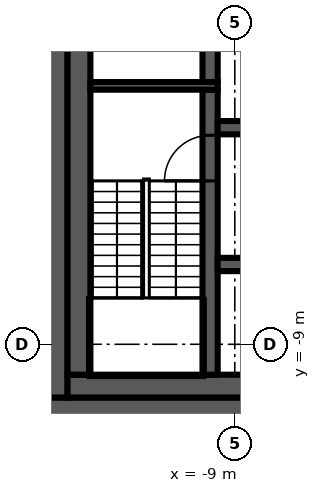
"""IFC4 building model, lengths in metres.
Left out: names, types, materials, properties, quantities, classifications, styles, units other than length and angle.
Written with IfcOpenShell. Run it as: python <this file> out.ifc"""

import sys

from ifc_helpers import new_model, si_unit, direction, frame, frame_2d, origin, place, context, subcontext, project, spatial, rectangle, extrude, element, fill, save


model = new_model("IFC4")
c1 = context("Model", 3, precision=1e-05, world=origin(), true_north=direction((0.0, 1.0)))
c2 = subcontext(c1, "Body", "Model", "MODEL_VIEW")
j1 = project(units=[si_unit("LENGTHUNIT", "METRE"), si_unit("PLANEANGLEUNIT", "RADIAN")], contexts=[c1])
p1 = place(None, origin())
s1 = spatial("IfcSite", under=j1, at=p1, CompositionType="ELEMENT")
p2 = place(p1, origin())
s2 = spatial("IfcBuilding", under=s1, at=p2, CompositionType="ELEMENT")
p3 = place(p2, frame((0.0, 0.0, 336.2)))
s3 = spatial("IfcBuildingStorey", under=s2, at=p3, CompositionType="ELEMENT", Elevation=336.2)
p4 = place(p3, frame((14.0, -10.7, 0.0), z_axis=(0.0, 0.0, 1.0), x_axis=(-1.0, 0.0, 0.0)))
e1 = element("IfcWall", 1, at=p4, inside=s3, PredefinedType="SHEAR", context=c2, shape_type="SweptSolid", body=[
    extrude(rectangle(XDim=28.0, YDim=0.6, at=frame_2d((14.0, 0.0))), origin(), (0.0, 0.0, 1.0), 3.82),
])
p5 = place(p4, frame((5.1, 0.0, 0.0)))
e2 = element("IfcOpeningElement", 2, at=p5, cuts=e1, PredefinedType="OPENING", context=c2, shape_type="SweptSolid", body=[
    extrude(rectangle(XDim=1.6, YDim=2.1, at=frame_2d((0.8, 1.05))), frame((0.0, 0.31, 0.0), z_axis=(0.0, -1.0, 0.0), x_axis=(1.0, 0.0, 0.0)), (0.0, 0.0, 1.0), 0.62),
])
p6 = place(p3, frame((-13.7, -10.4, 0.0), z_axis=(0.0, 0.0, 1.0), x_axis=(0.0, 1.0, 0.0)))
e3 = element("IfcWall", 3, at=p6, inside=s3, PredefinedType="SHEAR", context=c2, shape_type="SweptSolid", body=[
    extrude(rectangle(XDim=20.8, YDim=0.6, at=frame_2d((10.4, 0.0))), origin(), (0.0, 0.0, 1.0), 3.82),
])
p7 = place(p3, frame((6.9, -10.1, 0.0), z_axis=(0.0, 0.0, 1.0), x_axis=(-1.0, 0.0, 0.0)))
e4 = element("IfcWall", 4, at=p7, inside=s3, PredefinedType="SHEAR", context=c2, shape_type="SweptSolid", body=[
    extrude(rectangle(XDim=20.3, YDim=0.6, at=frame_2d((10.15, 0.0))), origin(), (0.0, 0.0, 1.0), 3.82),
])
p8 = place(p3, frame((-13.1, -9.8, 0.0), z_axis=(0.0, 0.0, 1.0), x_axis=(0.0, 1.0, 0.0)))
e5 = element("IfcWall", 5, at=p8, inside=s3, PredefinedType="SHEAR", context=c2, shape_type="SweptSolid", body=[
    extrude(rectangle(XDim=19.6, YDim=0.6, at=frame_2d((9.8, 0.0))), origin(), (0.0, 0.0, 1.0), 3.82),
])
p9 = place(p3, frame((-9.65, -9.8, 0.0), z_axis=(0.0, 0.0, 1.0), x_axis=(0.0, 1.0, 0.0)))
e6 = element("IfcWall", 6, at=p9, inside=s3, PredefinedType="SHEAR", context=c2, shape_type="SweptSolid", body=[
    extrude(rectangle(XDim=7.5, YDim=0.4, at=frame_2d((3.75, 0.0))), origin(), (0.0, 0.0, 1.0), 3.82),
])
p10 = place(p9, frame((5.1, 0.0, 0.0)))
e7 = element("IfcOpeningElement", 7, at=p10, cuts=e6, PredefinedType="OPENING", context=c2, shape_type="SweptSolid", body=[
    extrude(rectangle(XDim=1.2, YDim=2.1, at=frame_2d((0.6, 1.05))), frame((0.0, 0.21, 0.0), z_axis=(0.0, -1.0, 0.0), x_axis=(1.0, 0.0, 0.0)), (0.0, 0.0, 1.0), 0.42),
])
p11 = place(p3, frame((-9.65, -2.1, 0.0), z_axis=(0.0, 0.0, 1.0), x_axis=(0.0, 1.0, 0.0)))
e8 = element("IfcWall", 8, at=p11, inside=s3, PredefinedType="SHEAR", context=c2, shape_type="SweptSolid", body=[
    extrude(rectangle(XDim=4.2, YDim=0.4, at=frame_2d((2.1, 0.0))), origin(), (0.0, 0.0, 1.0), 3.82),
])
p12 = place(p3, frame((-9.45, -2.2, 0.0), z_axis=(0.0, 0.0, 1.0), x_axis=(-1.0, 0.0, 0.0)))
e9 = element("IfcWall", 9, at=p12, inside=s3, PredefinedType="SHEAR", context=c2, shape_type="SweptSolid", body=[
    extrude(rectangle(XDim=3.35, YDim=0.2, at=frame_2d((1.675, 0.0))), origin(), (0.0, 0.0, 1.0), 3.82),
])
p13 = place(p3, frame((-9.45, -3.3, 0.0), z_axis=(0.0, 0.0, 1.0), x_axis=(1.0, 0.0, 0.0)))
e10 = element("IfcWall", 10, at=p13, inside=s3, PredefinedType="SHEAR", context=c2, shape_type="SweptSolid", body=[
    extrude(rectangle(XDim=18.9, YDim=0.35, at=frame_2d((9.45, 0.0))), origin(), (0.0, 0.0, 1.0), 3.82),
])
p14 = place(p13, frame((17.0, 0.0, 0.0)))
e11 = element("IfcOpeningElement", 11, at=p14, cuts=e10, PredefinedType="OPENING", context=c2, shape_type="SweptSolid", body=[
    extrude(rectangle(XDim=1.1, YDim=2.1, at=frame_2d((0.55, 1.05))), frame((0.0, 0.185, 0.0), z_axis=(0.0, -1.0, 0.0), x_axis=(1.0, 0.0, 0.0)), (0.0, 0.0, 1.0), 0.37),
])
p15 = place(p13, frame((0.9, 0.0, 0.0)))
e12 = element("IfcOpeningElement", 12, at=p15, cuts=e10, PredefinedType="OPENING", context=c2, shape_type="SweptSolid", body=[
    extrude(rectangle(XDim=0.9, YDim=2.1, at=frame_2d((0.45, 1.05))), frame((0.0, 0.185, 0.0), z_axis=(0.0, -1.0, 0.0), x_axis=(1.0, 0.0, 0.0)), (0.0, 0.0, 1.0), 0.37),
])
p16 = place(p13, frame((4.95, 0.0, 0.0)))
e13 = element("IfcOpeningElement", 13, at=p16, cuts=e10, PredefinedType="OPENING", context=c2, shape_type="SweptSolid", body=[
    extrude(rectangle(XDim=0.9, YDim=2.1, at=frame_2d((0.45, 1.05))), frame((0.0, 0.185, 0.0), z_axis=(0.0, -1.0, 0.0), x_axis=(1.0, 0.0, 0.0)), (0.0, 0.0, 1.0), 0.37),
])
p17 = place(p13, frame((9.0, 0.0, 0.0)))
e14 = element("IfcOpeningElement", 14, at=p17, cuts=e10, PredefinedType="OPENING", context=c2, shape_type="SweptSolid", body=[
    extrude(rectangle(XDim=0.9, YDim=2.1, at=frame_2d((0.45, 1.05))), frame((0.0, 0.185, 0.0), z_axis=(0.0, -1.0, 0.0), x_axis=(1.0, 0.0, 0.0)), (0.0, 0.0, 1.0), 0.37),
])
p18 = place(p13, frame((13.05, 0.0, 0.0)))
e15 = element("IfcOpeningElement", 15, at=p18, cuts=e10, PredefinedType="OPENING", context=c2, shape_type="SweptSolid", body=[
    extrude(rectangle(XDim=0.9, YDim=2.1, at=frame_2d((0.45, 1.05))), frame((0.0, 0.185, 0.0), z_axis=(0.0, -1.0, 0.0), x_axis=(1.0, 0.0, 0.0)), (0.0, 0.0, 1.0), 0.37),
])
p19 = place(p3, frame((9.45, -6.9, 0.0), z_axis=(0.0, 0.0, 1.0), x_axis=(-1.0, 0.0, 0.0)))
e16 = element("IfcWall", 16, at=p19, inside=s3, PredefinedType="SHEAR", context=c2, shape_type="SweptSolid", body=[
    extrude(rectangle(XDim=18.9, YDim=0.35, at=frame_2d((9.45, 0.0))), origin(), (0.0, 0.0, 1.0), 3.82),
])
p20 = place(p19, frame((17.0, 0.0, 0.0)))
e17 = element("IfcOpeningElement", 17, at=p20, cuts=e16, PredefinedType="OPENING", context=c2, shape_type="SweptSolid", body=[
    extrude(rectangle(XDim=1.1, YDim=2.1, at=frame_2d((0.55, 1.05))), frame((0.0, 0.185, 0.0), z_axis=(0.0, -1.0, 0.0), x_axis=(1.0, 0.0, 0.0)), (0.0, 0.0, 1.0), 0.37),
])
p21 = place(p19, frame((14.3, 0.0, 0.0)))
e18 = element("IfcOpeningElement", 18, at=p21, cuts=e16, PredefinedType="OPENING", context=c2, shape_type="SweptSolid", body=[
    extrude(rectangle(XDim=1.1, YDim=2.1, at=frame_2d((0.55, 1.05))), frame((0.0, 0.185, 0.0), z_axis=(0.0, -1.0, 0.0), x_axis=(1.0, 0.0, 0.0)), (0.0, 0.0, 1.0), 0.37),
])
p22 = place(p19, frame((11.6, 0.0, 0.0)))
e19 = element("IfcOpeningElement", 19, at=p22, cuts=e16, PredefinedType="OPENING", context=c2, shape_type="SweptSolid", body=[
    extrude(rectangle(XDim=1.1, YDim=2.1, at=frame_2d((0.55, 1.05))), frame((0.0, 0.185, 0.0), z_axis=(0.0, -1.0, 0.0), x_axis=(1.0, 0.0, 0.0)), (0.0, 0.0, 1.0), 0.37),
])
p23 = place(p19, frame((8.9, 0.0, 0.0)))
e20 = element("IfcOpeningElement", 20, at=p23, cuts=e16, PredefinedType="OPENING", context=c2, shape_type="SweptSolid", body=[
    extrude(rectangle(XDim=1.1, YDim=2.1, at=frame_2d((0.55, 1.05))), frame((0.0, 0.185, 0.0), z_axis=(0.0, -1.0, 0.0), x_axis=(1.0, 0.0, 0.0)), (0.0, 0.0, 1.0), 0.37),
])
p24 = place(p19, frame((0.75, 0.0, 0.0)))
e21 = element("IfcOpeningElement", 21, at=p24, cuts=e16, PredefinedType="OPENING", context=c2, shape_type="SweptSolid", body=[
    extrude(rectangle(XDim=1.2, YDim=2.1, at=frame_2d((0.6, 1.05))), frame((0.0, 0.185, 0.0), z_axis=(0.0, -1.0, 0.0), x_axis=(1.0, 0.0, 0.0)), (0.0, 0.0, 1.0), 0.37),
])
p25 = place(p19, frame((6.3, 0.0, 0.0)))
e22 = element("IfcOpeningElement", 22, at=p25, cuts=e16, PredefinedType="OPENING", context=c2, shape_type="SweptSolid", body=[
    extrude(rectangle(XDim=0.9, YDim=2.1, at=frame_2d((0.45, 1.05))), frame((0.0, 0.185, 0.0), z_axis=(0.0, -1.0, 0.0), x_axis=(1.0, 0.0, 0.0)), (0.0, 0.0, 1.0), 0.37),
])
p26 = place(p19, frame((3.6, 0.0, 0.0)))
e23 = element("IfcOpeningElement", 23, at=p26, cuts=e16, PredefinedType="OPENING", context=c2, shape_type="SweptSolid", body=[
    extrude(rectangle(XDim=0.9, YDim=2.1, at=frame_2d((0.45, 1.05))), frame((0.0, 0.185, 0.0), z_axis=(0.0, -1.0, 0.0), x_axis=(1.0, 0.0, 0.0)), (0.0, 0.0, 1.0), 0.37),
])
p27 = place(p10, origin())
e24 = element("IfcDoor", 24, at=p27, inside=s3, OperationType="SINGLE_SWING_LEFT", PredefinedType="DOOR", context=c2, shape_type="SweptSolid", body=[
    extrude(rectangle(XDim=1.2, YDim=2.1, at=frame_2d((0.6, 1.05))), frame((0.0, 0.025, 0.0), z_axis=(0.0, -1.0, 0.0), x_axis=(1.0, 0.0, 0.0)), (0.0, 0.0, 1.0), 0.05),
])
fill(e7, e24)
save(model, sys.argv[1])
